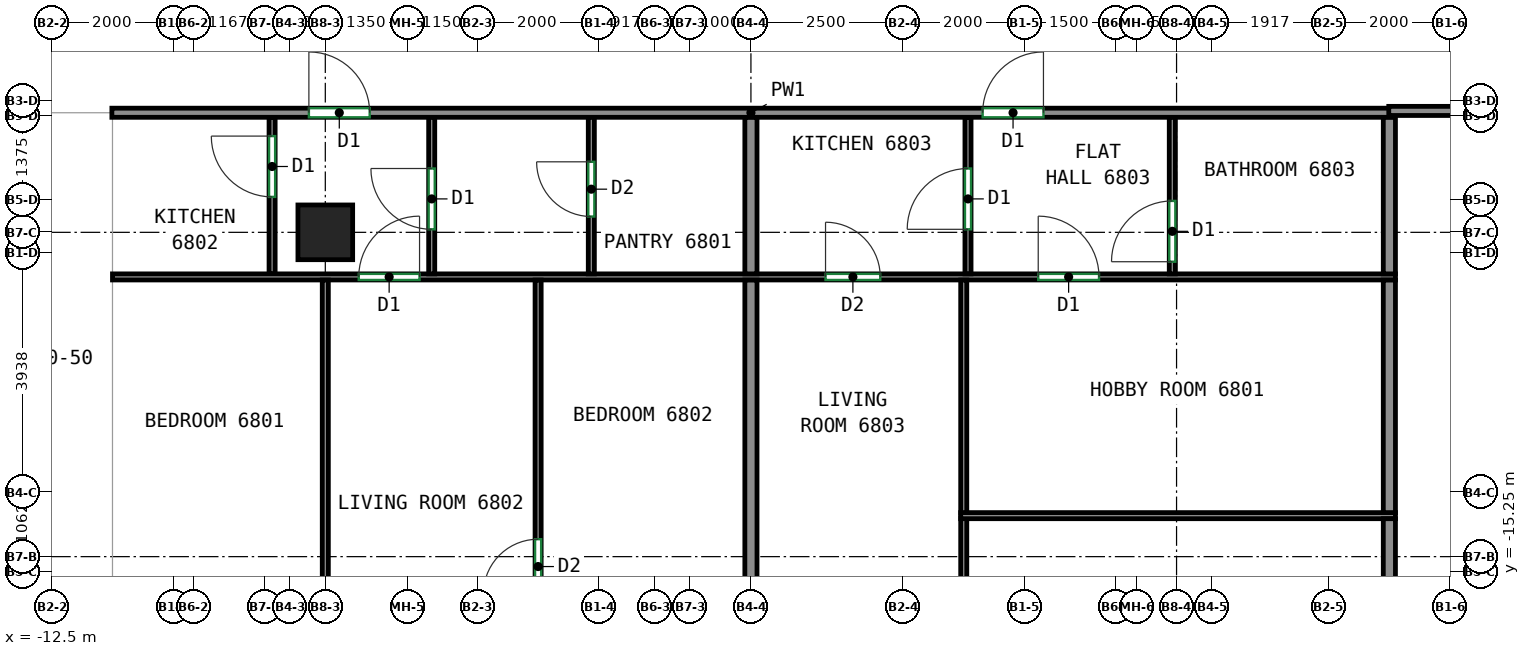
"""IFC4 building model, lengths in metres.
Left out: names, types, materials, properties, quantities, classifications, styles, units other than length and angle.
Written with IfcOpenShell. Run it as: python <this file> out.ifc"""

import sys

from ifc_helpers import new_model, si_unit, direction, frame, frame_2d, origin, origin_2d, place, context, subcontext, project, spatial, rectangle, extrude, source, transform, mapped, element, fill, save


model = new_model("IFC4")
c1 = context("Model", 3, precision=1e-05, world=origin(), true_north=direction((0.0, 1.0)))
c2 = subcontext(c1, "Body", "Model", "MODEL_VIEW")
j1 = project(units=[si_unit("LENGTHUNIT", "METRE"), si_unit("PLANEANGLEUNIT", "RADIAN")], contexts=[c1])
p1 = place(None, origin())
s1 = spatial("IfcSite", under=j1, at=p1, CompositionType="ELEMENT")
p2 = place(p1, origin())
s2 = spatial("IfcBuilding", under=s1, at=p2, CompositionType="ELEMENT")
p3 = place(p2, frame((0.0, 0.0, 277.2)))
s3 = spatial("IfcBuildingStorey", under=s2, at=p3, CompositionType="ELEMENT", Elevation=277.2)
m1 = source(origin(), c2, "Body", "SweptSolid", [
    extrude(rectangle(XDim=0.9, YDim=0.9, at=origin_2d()), origin(), (0.0, 0.0, 1.0), 3.12),
])
p4 = place(p3, frame((-8.0, -9.667, 0.0), z_axis=(0.0, 0.0, 1.0), x_axis=(1.0, 0.0, 0.0)))
e1 = element("IfcColumn", 1, at=p4, inside=s3, PredefinedType="COLUMN", context=c2, shape_type="MappedRepresentation", body=[
    mapped(m1, transform((0.0, 0.0, 0.0))),
])
p5 = place(p3, frame((-11.51, -7.7, 0.0), z_axis=(0.0, 0.0, 1.0), x_axis=(1.0, 0.0, 0.0)))
e2 = element("IfcWall", 2, at=p5, inside=s3, PredefinedType="PARTITIONING", context=c2, shape_type="SweptSolid", body=[
    extrude(rectangle(XDim=21.02, YDim=0.15, at=frame_2d((10.51, 0.0))), origin(), (0.0, 0.0, 1.0), 3.12),
])
p6 = place(p5, frame((3.24, 0.0, 0.0)))
e3 = element("IfcOpeningElement", 3, at=p6, cuts=e2, PredefinedType="OPENING", context=c2, shape_type="SweptSolid", body=[
    extrude(rectangle(XDim=1.0, YDim=2.1, at=frame_2d((0.5, 1.05))), frame((0.0, 0.085, 0.0), z_axis=(0.0, -1.0, 0.0), x_axis=(1.0, 0.0, 0.0)), (0.0, 0.0, 1.0), 0.17),
])
p7 = place(p5, frame((14.321, 0.0, 0.0)))
e4 = element("IfcOpeningElement", 4, at=p7, cuts=e2, PredefinedType="OPENING", context=c2, shape_type="SweptSolid", body=[
    extrude(rectangle(XDim=1.0, YDim=2.1, at=frame_2d((0.5, 1.05))), frame((0.0, 0.085, 0.0), z_axis=(0.0, -1.0, 0.0), x_axis=(1.0, 0.0, 0.0)), (0.0, 0.0, 1.0), 0.17),
])
p8 = place(p3, frame((9.49, -7.67, 0.0), z_axis=(0.0, 0.0, 1.0), x_axis=(1.0, 0.0, 0.0)))
e5 = element("IfcWall", 5, at=p8, inside=s3, PredefinedType="PARTITIONING", context=c2, shape_type="SweptSolid", body=[
    extrude(rectangle(XDim=9.61, YDim=0.15, at=frame_2d((4.805, 0.0))), origin(), (0.0, 0.0, 1.0), 3.12),
])
p9 = place(p8, frame((3.304, 0.0, 0.0)))
e6 = element("IfcOpeningElement", 6, at=p9, cuts=e5, PredefinedType="OPENING", context=c2, shape_type="SweptSolid", body=[
    extrude(rectangle(XDim=0.9, YDim=2.1, at=frame_2d((0.45, 1.05))), frame((0.0, 0.085, 0.0), z_axis=(0.0, -1.0, 0.0), x_axis=(1.0, 0.0, 0.0)), (0.0, 0.0, 1.0), 0.17),
])
p10 = place(p3, frame((-8.875, -10.35, 0.0), z_axis=(0.0, 0.0, 1.0), x_axis=(0.0, 1.0, 0.0)))
e7 = element("IfcWall", 7, at=p10, inside=s3, PredefinedType="PARTITIONING", context=c2, shape_type="SweptSolid", body=[
    extrude(rectangle(XDim=2.573, YDim=0.1, at=frame_2d((1.287, 0.0))), origin(), (0.0, 0.0, 1.0), 3.12),
])
p11 = place(p10, frame((1.266, 0.0, 0.0)))
e8 = element("IfcOpeningElement", 8, at=p11, cuts=e7, PredefinedType="OPENING", context=c2, shape_type="SweptSolid", body=[
    extrude(rectangle(XDim=1.0, YDim=2.1, at=frame_2d((0.5, 1.05))), frame((0.0, 0.06, 0.0), z_axis=(0.0, -1.0, 0.0), x_axis=(1.0, 0.0, 0.0)), (0.0, 0.0, 1.0), 0.12),
])
p12 = place(p3, frame((-11.5, -10.4, 0.0), z_axis=(0.0, 0.0, 1.0), x_axis=(1.0, 0.0, 0.0)))
e9 = element("IfcWall", 9, at=p12, inside=s3, PredefinedType="PARTITIONING", context=c2, shape_type="SweptSolid", body=[
    extrude(rectangle(XDim=21.1, YDim=0.1, at=frame_2d((10.55, 0.0))), origin(), (0.0, 0.0, 1.0), 3.12),
])
p13 = place(p12, frame((4.05, 0.0, 0.0)))
e10 = element("IfcOpeningElement", 10, at=p13, cuts=e9, PredefinedType="OPENING", context=c2, shape_type="SweptSolid", body=[
    extrude(rectangle(XDim=1.0, YDim=2.1, at=frame_2d((0.5, 1.05))), frame((0.0, 0.06, 0.0), z_axis=(0.0, -1.0, 0.0), x_axis=(1.0, 0.0, 0.0)), (0.0, 0.0, 1.0), 0.12),
])
p14 = place(p12, frame((11.727, 0.0, 0.0)))
e11 = element("IfcOpeningElement", 11, at=p14, cuts=e9, PredefinedType="OPENING", context=c2, shape_type="SweptSolid", body=[
    extrude(rectangle(XDim=0.9, YDim=2.1, at=frame_2d((0.45, 1.05))), frame((0.0, 0.06, 0.0), z_axis=(0.0, -1.0, 0.0), x_axis=(1.0, 0.0, 0.0)), (0.0, 0.0, 1.0), 0.12),
])
p15 = place(p12, frame((15.225, 0.0, 0.0)))
e12 = element("IfcOpeningElement", 12, at=p15, cuts=e9, PredefinedType="OPENING", context=c2, shape_type="SweptSolid", body=[
    extrude(rectangle(XDim=1.0, YDim=2.1, at=frame_2d((0.5, 1.05))), frame((0.0, 0.06, 0.0), z_axis=(0.0, -1.0, 0.0), x_axis=(1.0, 0.0, 0.0)), (0.0, 0.0, 1.0), 0.12),
])
p16 = place(p3, frame((-6.25, -10.35, 0.0), z_axis=(0.0, 0.0, 1.0), x_axis=(0.0, 1.0, 0.0)))
e13 = element("IfcWall", 13, at=p16, inside=s3, PredefinedType="PARTITIONING", context=c2, shape_type="SweptSolid", body=[
    extrude(rectangle(XDim=2.573, YDim=0.1, at=frame_2d((1.287, 0.0))), origin(), (0.0, 0.0, 1.0), 3.12),
])
p17 = place(p16, frame((0.733, 0.0, 0.0)))
e14 = element("IfcOpeningElement", 14, at=p17, cuts=e13, PredefinedType="OPENING", context=c2, shape_type="SweptSolid", body=[
    extrude(rectangle(XDim=1.0, YDim=2.1, at=frame_2d((0.5, 1.05))), frame((0.0, 0.06, 0.0), z_axis=(0.0, -1.0, 0.0), x_axis=(1.0, 0.0, 0.0)), (0.0, 0.0, 1.0), 0.12),
])
p18 = place(p3, frame((-3.625, -10.35, 0.0), z_axis=(0.0, 0.0, 1.0), x_axis=(0.0, 1.0, 0.0)))
e15 = element("IfcWall", 15, at=p18, inside=s3, PredefinedType="PARTITIONING", context=c2, shape_type="SweptSolid", body=[
    extrude(rectangle(XDim=2.573, YDim=0.1, at=frame_2d((1.287, 0.0))), origin(), (0.0, 0.0, 1.0), 3.12),
])
p19 = place(p18, frame((0.943, 0.0, 0.0)))
e16 = element("IfcOpeningElement", 16, at=p19, cuts=e15, PredefinedType="OPENING", context=c2, shape_type="SweptSolid", body=[
    extrude(rectangle(XDim=0.9, YDim=2.1, at=frame_2d((0.45, 1.05))), frame((0.0, 0.06, 0.0), z_axis=(0.0, -1.0, 0.0), x_axis=(1.0, 0.0, 0.0)), (0.0, 0.0, 1.0), 0.12),
])
p20 = place(p3, frame((-1.0, -10.35, 0.0), z_axis=(0.0, 0.0, 1.0), x_axis=(0.0, 1.0, 0.0)))
e17 = element("IfcWall", 17, at=p20, inside=s3, PredefinedType="PARTITIONING", context=c2, shape_type="SweptSolid", body=[
    extrude(rectangle(XDim=2.573, YDim=0.2, at=frame_2d((1.287, 0.0))), origin(), (0.0, 0.0, 1.0), 3.12),
])
p21 = place(p3, frame((-8.0, -17.725, 0.0), z_axis=(0.0, 0.0, 1.0), x_axis=(0.0, 1.0, 0.0)))
e18 = element("IfcWall", 18, at=p21, inside=s3, PredefinedType="PARTITIONING", context=c2, shape_type="SweptSolid", body=[
    extrude(rectangle(XDim=7.273, YDim=0.1, at=frame_2d((3.637, 0.0))), origin(), (0.0, 0.0, 1.0), 3.12),
])
p22 = place(p21, frame((1.111, 0.0, 0.0)))
e19 = element("IfcOpeningElement", 19, at=p22, cuts=e18, PredefinedType="OPENING", context=c2, shape_type="SweptSolid", body=[
    extrude(rectangle(XDim=0.9, YDim=2.1, at=frame_2d((0.45, 1.05))), frame((0.0, 0.06, 0.0), z_axis=(0.0, -1.0, 0.0), x_axis=(1.0, 0.0, 0.0)), (0.0, 0.0, 1.0), 0.12),
])
p23 = place(p3, frame((-4.5, -18.25, 0.0), z_axis=(0.0, 0.0, 1.0), x_axis=(0.0, 1.0, 0.0)))
e20 = element("IfcWall", 20, at=p23, inside=s3, PredefinedType="PARTITIONING", context=c2, shape_type="SweptSolid", body=[
    extrude(rectangle(XDim=7.798, YDim=0.1, at=frame_2d((3.899, 0.0))), origin(), (0.0, 0.0, 1.0), 3.12),
])
p24 = place(p23, frame((2.637, 0.0, 0.0)))
e21 = element("IfcOpeningElement", 21, at=p24, cuts=e20, PredefinedType="OPENING", context=c2, shape_type="SweptSolid", body=[
    extrude(rectangle(XDim=0.9, YDim=2.1, at=frame_2d((0.45, 1.05))), frame((0.0, 0.06, 0.0), z_axis=(0.0, -1.0, 0.0), x_axis=(1.0, 0.0, 0.0)), (0.0, 0.0, 1.0), 0.12),
])
p25 = place(p3, frame((-1.0, -17.725, 0.0), z_axis=(0.0, 0.0, 1.0), x_axis=(0.0, 1.0, 0.0)))
e22 = element("IfcWall", 22, at=p25, inside=s3, PredefinedType="PARTITIONING", context=c2, shape_type="SweptSolid", body=[
    extrude(rectangle(XDim=7.273, YDim=0.2, at=frame_2d((3.637, 0.0))), origin(), (0.0, 0.0, 1.0), 3.12),
])
p26 = place(p3, frame((2.57, -10.35, 0.0), z_axis=(0.0, 0.0, 1.0), x_axis=(0.0, 1.0, 0.0)))
e23 = element("IfcWall", 23, at=p26, inside=s3, PredefinedType="PARTITIONING", context=c2, shape_type="SweptSolid", body=[
    extrude(rectangle(XDim=2.573, YDim=0.1, at=frame_2d((1.287, 0.0))), origin(), (0.0, 0.0, 1.0), 3.12),
])
p27 = place(p26, frame((0.733, 0.0, 0.0)))
e24 = element("IfcOpeningElement", 24, at=p27, cuts=e23, PredefinedType="OPENING", context=c2, shape_type="SweptSolid", body=[
    extrude(rectangle(XDim=1.0, YDim=2.1, at=frame_2d((0.5, 1.05))), frame((0.0, 0.06, 0.0), z_axis=(0.0, -1.0, 0.0), x_axis=(1.0, 0.0, 0.0)), (0.0, 0.0, 1.0), 0.12),
])
p28 = place(p3, frame((5.93, -10.35, 0.0), z_axis=(0.0, 0.0, 1.0), x_axis=(0.0, 1.0, 0.0)))
e25 = element("IfcWall", 25, at=p28, inside=s3, PredefinedType="PARTITIONING", context=c2, shape_type="SweptSolid", body=[
    extrude(rectangle(XDim=2.573, YDim=0.1, at=frame_2d((1.287, 0.0))), origin(), (0.0, 0.0, 1.0), 3.12),
])
p29 = place(p28, frame((0.2, 0.0, 0.0)))
e26 = element("IfcOpeningElement", 26, at=p29, cuts=e25, PredefinedType="OPENING", context=c2, shape_type="SweptSolid", body=[
    extrude(rectangle(XDim=1.0, YDim=2.1, at=frame_2d((0.5, 1.05))), frame((0.0, 0.06, 0.0), z_axis=(0.0, -1.0, 0.0), x_axis=(1.0, 0.0, 0.0)), (0.0, 0.0, 1.0), 0.12),
])
p30 = place(p3, frame((9.5, -10.35, 0.0), z_axis=(0.0, 0.0, 1.0), x_axis=(0.0, 1.0, 0.0)))
e27 = element("IfcWall", 27, at=p30, inside=s3, PredefinedType="PARTITIONING", context=c2, shape_type="SweptSolid", body=[
    extrude(rectangle(XDim=2.573, YDim=0.2, at=frame_2d((1.287, 0.0))), origin(), (0.0, 0.0, 1.0), 3.12),
])
p31 = place(p3, frame((2.5, -18.25, 0.0), z_axis=(0.0, 0.0, 1.0), x_axis=(0.0, 1.0, 0.0)))
e28 = element("IfcWall", 28, at=p31, inside=s3, PredefinedType="PARTITIONING", context=c2, shape_type="SweptSolid", body=[
    extrude(rectangle(XDim=3.884, YDim=0.1, at=frame_2d((1.942, 0.0))), origin(), (0.0, 0.0, 1.0), 3.12),
])
p32 = place(p31, frame((1.337, 0.0, 0.0)))
e29 = element("IfcOpeningElement", 29, at=p32, cuts=e28, PredefinedType="OPENING", context=c2, shape_type="SweptSolid", body=[
    extrude(rectangle(XDim=0.9, YDim=2.1, at=frame_2d((0.45, 1.05))), frame((0.0, 0.06, 0.0), z_axis=(0.0, -1.0, 0.0), x_axis=(1.0, 0.0, 0.0)), (0.0, 0.0, 1.0), 0.12),
])
p33 = place(p3, frame((2.5, -14.286, 0.0), z_axis=(0.0, 0.0, 1.0), x_axis=(0.0, 1.0, 0.0)))
e30 = element("IfcWall", 30, at=p33, inside=s3, PredefinedType="PARTITIONING", context=c2, shape_type="SweptSolid", body=[
    extrude(rectangle(XDim=3.834, YDim=0.1, at=frame_2d((1.917, 0.0))), origin(), (0.0, 0.0, 1.0), 3.12),
])
p34 = place(p3, frame((9.6, -14.326, 0.0), z_axis=(0.0, 0.0, 1.0), x_axis=(-1.0, 0.0, 0.0)))
e31 = element("IfcWall", 31, at=p34, inside=s3, PredefinedType="PARTITIONING", context=c2, shape_type="SweptSolid", body=[
    extrude(rectangle(XDim=7.15, YDim=0.1, at=frame_2d((3.575, 0.0))), origin(), (0.0, 0.0, 1.0), 3.12),
])
p35 = place(p3, frame((9.5, -18.25, 0.0), z_axis=(0.0, 0.0, 1.0), x_axis=(0.0, 1.0, 0.0)))
e32 = element("IfcWall", 32, at=p35, inside=s3, PredefinedType="PARTITIONING", context=c2, shape_type="SweptSolid", body=[
    extrude(rectangle(XDim=3.874, YDim=0.2, at=frame_2d((1.937, 0.0))), origin(), (0.0, 0.0, 1.0), 3.12),
])
p36 = place(p3, frame((9.5, -14.276, 0.0), z_axis=(0.0, 0.0, 1.0), x_axis=(0.0, 1.0, 0.0)))
e33 = element("IfcWall", 33, at=p36, inside=s3, PredefinedType="PARTITIONING", context=c2, shape_type="SweptSolid", body=[
    extrude(rectangle(XDim=3.824, YDim=0.2, at=frame_2d((1.912, 0.0))), origin(), (0.0, 0.0, 1.0), 3.12),
])
p37 = place(p24, origin())
e34 = element("IfcDoor", 34, at=p37, inside=s3, OperationType="SINGLE_SWING_LEFT", PredefinedType="DOOR", context=c2, shape_type="SweptSolid", body=[
    extrude(rectangle(XDim=0.9, YDim=2.1, at=frame_2d((0.45, 1.05))), frame((0.0, 0.025, 0.0), z_axis=(0.0, -1.0, 0.0), x_axis=(1.0, 0.0, 0.0)), (0.0, 0.0, 1.0), 0.05),
])
fill(e21, e34)
p38 = place(p13, origin())
e35 = element("IfcDoor", 35, at=p38, inside=s3, OperationType="SINGLE_SWING_RIGHT", PredefinedType="DOOR", context=c2, shape_type="SweptSolid", body=[
    extrude(rectangle(XDim=1.0, YDim=2.1, at=frame_2d((0.5, 1.05))), frame((0.0, 0.025, 0.0), z_axis=(0.0, -1.0, 0.0), x_axis=(1.0, 0.0, 0.0)), (0.0, 0.0, 1.0), 0.05),
])
fill(e10, e35)
p39 = place(p14, origin())
e36 = element("IfcDoor", 36, at=p39, inside=s3, OperationType="SINGLE_SWING_LEFT", PredefinedType="DOOR", context=c2, shape_type="SweptSolid", body=[
    extrude(rectangle(XDim=0.9, YDim=2.1, at=frame_2d((0.45, 1.05))), frame((0.0, 0.025, 0.0), z_axis=(0.0, -1.0, 0.0), x_axis=(1.0, 0.0, 0.0)), (0.0, 0.0, 1.0), 0.05),
])
fill(e11, e36)
p40 = place(p15, origin())
e37 = element("IfcDoor", 37, at=p40, inside=s3, OperationType="SINGLE_SWING_LEFT", PredefinedType="DOOR", context=c2, shape_type="SweptSolid", body=[
    extrude(rectangle(XDim=1.0, YDim=2.1, at=frame_2d((0.5, 1.05))), frame((0.0, 0.025, 0.0), z_axis=(0.0, -1.0, 0.0), x_axis=(1.0, 0.0, 0.0)), (0.0, 0.0, 1.0), 0.05),
])
fill(e12, e37)
p41 = place(p29, origin())
e38 = element("IfcDoor", 38, at=p41, inside=s3, OperationType="SINGLE_SWING_LEFT", PredefinedType="DOOR", context=c2, shape_type="SweptSolid", body=[
    extrude(rectangle(XDim=1.0, YDim=2.1, at=frame_2d((0.5, 1.05))), frame((0.0, 0.025, 0.0), z_axis=(0.0, -1.0, 0.0), x_axis=(1.0, 0.0, 0.0)), (0.0, 0.0, 1.0), 0.05),
])
fill(e26, e38)
p42 = place(p17, origin())
e39 = element("IfcDoor", 39, at=p42, inside=s3, OperationType="SINGLE_SWING_RIGHT", PredefinedType="DOOR", context=c2, shape_type="SweptSolid", body=[
    extrude(rectangle(XDim=1.0, YDim=2.1, at=frame_2d((0.5, 1.05))), frame((0.0, 0.025, 0.0), z_axis=(0.0, -1.0, 0.0), x_axis=(1.0, 0.0, 0.0)), (0.0, 0.0, 1.0), 0.05),
])
fill(e14, e39)
p43 = place(p27, origin())
e40 = element("IfcDoor", 40, at=p43, inside=s3, OperationType="SINGLE_SWING_LEFT", PredefinedType="DOOR", context=c2, shape_type="SweptSolid", body=[
    extrude(rectangle(XDim=1.0, YDim=2.1, at=frame_2d((0.5, 1.05))), frame((0.0, 0.025, 0.0), z_axis=(0.0, -1.0, 0.0), x_axis=(1.0, 0.0, 0.0)), (0.0, 0.0, 1.0), 0.05),
])
fill(e24, e40)
p44 = place(p19, origin())
e41 = element("IfcDoor", 41, at=p44, inside=s3, OperationType="SINGLE_SWING_RIGHT", PredefinedType="DOOR", context=c2, shape_type="SweptSolid", body=[
    extrude(rectangle(XDim=0.9, YDim=2.1, at=frame_2d((0.45, 1.05))), frame((0.0, 0.025, 0.0), z_axis=(0.0, -1.0, 0.0), x_axis=(1.0, 0.0, 0.0)), (0.0, 0.0, 1.0), 0.05),
])
fill(e16, e41)
p45 = place(p11, origin())
e42 = element("IfcDoor", 42, at=p45, inside=s3, OperationType="SINGLE_SWING_RIGHT", PredefinedType="DOOR", context=c2, shape_type="SweptSolid", body=[
    extrude(rectangle(XDim=1.0, YDim=2.1, at=frame_2d((0.5, 1.05))), frame((0.0, 0.025, 0.0), z_axis=(0.0, -1.0, 0.0), x_axis=(1.0, 0.0, 0.0)), (0.0, 0.0, 1.0), 0.05),
])
fill(e8, e42)
p46 = place(p6, origin())
e43 = element("IfcDoor", 43, at=p46, inside=s3, OperationType="SINGLE_SWING_LEFT", PredefinedType="DOOR", context=c2, shape_type="SweptSolid", body=[
    extrude(rectangle(XDim=1.0, YDim=2.1, at=frame_2d((0.5, 1.05))), frame((0.0, 0.025, 0.0), z_axis=(0.0, -1.0, 0.0), x_axis=(1.0, 0.0, 0.0)), (0.0, 0.0, 1.0), 0.05),
])
fill(e3, e43)
p47 = place(p7, origin())
e44 = element("IfcDoor", 44, at=p47, inside=s3, OperationType="SINGLE_SWING_RIGHT", PredefinedType="DOOR", context=c2, shape_type="SweptSolid", body=[
    extrude(rectangle(XDim=1.0, YDim=2.1, at=frame_2d((0.5, 1.05))), frame((0.0, 0.025, 0.0), z_axis=(0.0, -1.0, 0.0), x_axis=(1.0, 0.0, 0.0)), (0.0, 0.0, 1.0), 0.05),
])
fill(e4, e44)
save(model, sys.argv[1])
